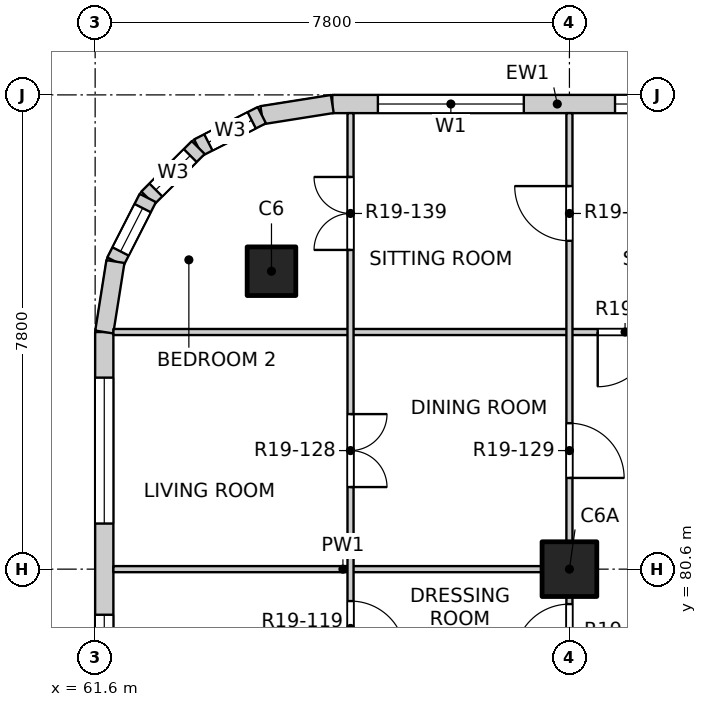
"""IFC4 building model, lengths in metres.
Left out: names, types, materials, properties, quantities, classifications, styles, units other than length and angle.
Written with IfcOpenShell. Run it as: python <this file> out.ifc"""

import sys

from ifc_helpers import new_model, si_unit, direction, frame, frame_2d, origin, origin_2d, place, context, subcontext, project, spatial, rectangle, extrude, element, fill, save


model = new_model("IFC4")
c1 = context("Model", 3, precision=1e-05, world=origin(), true_north=direction((0.0, 1.0)))
c2 = subcontext(c1, "Body", "Model", "MODEL_VIEW")
j1 = project(units=[si_unit("LENGTHUNIT", "METRE"), si_unit("PLANEANGLEUNIT", "RADIAN")], contexts=[c1])
p1 = place(None, origin())
s1 = spatial("IfcSite", under=j1, at=p1, CompositionType="ELEMENT")
p2 = place(p1, origin())
s2 = spatial("IfcBuilding", under=s1, at=p2, CompositionType="ELEMENT")
p3 = place(p2, frame((0.0, 0.0, 197.3)))
s3 = spatial("IfcBuildingStorey", under=s2, at=p3, CompositionType="ELEMENT", Elevation=197.3)
p4 = place(p3, frame((64.5, 85.5, -0.3), z_axis=(0.0, 0.0, 1.0), x_axis=(1.0, 0.0, 0.0)))
e1 = element("IfcColumn", 1, at=p4, inside=s3, PredefinedType="COLUMN", context=c2, shape_type="SweptSolid", body=[
    extrude(rectangle(XDim=0.8, YDim=0.8, at=origin_2d()), origin(), (0.0, 0.0, 1.0), 3.45),
])
p5 = place(p3, frame((69.4, 80.6, -0.3), z_axis=(0.0, 0.0, 1.0), x_axis=(1.0, 0.0, 0.0)))
e2 = element("IfcColumn", 2, at=p5, inside=s3, PredefinedType="COLUMN", context=c2, shape_type="SweptSolid", body=[
    extrude(rectangle(XDim=0.9, YDim=0.9, at=origin_2d()), origin(), (0.0, 0.0, 1.0), 3.45),
])
p6 = place(p3, frame((65.5, 88.25, 0.0), z_axis=(0.0, 0.0, 1.0), x_axis=(1.0, 0.0, 0.0)))
e3 = element("IfcWall", 3, at=p6, inside=s3, PredefinedType="SOLIDWALL", context=c2, shape_type="SweptSolid", body=[
    extrude(rectangle(XDim=7.4, YDim=0.3, at=frame_2d((3.7, 0.0))), origin(), (0.0, 0.0, 1.0), 2.7),
])
p7 = place(p6, frame((0.75, 0.0, 0.9)))
e4 = element("IfcOpeningElement", 4, at=p7, cuts=e3, PredefinedType="OPENING", context=c2, shape_type="SweptSolid", body=[
    extrude(rectangle(XDim=2.4, YDim=1.8, at=frame_2d((1.2, 0.9))), frame((0.0, 0.16, 0.0), z_axis=(0.0, -1.0, 0.0), x_axis=(1.0, 0.0, 0.0)), (0.0, 0.0, 1.0), 0.32),
])
p8 = place(p6, frame((4.65, 0.0, 0.9)))
e5 = element("IfcOpeningElement", 5, at=p8, cuts=e3, PredefinedType="OPENING", context=c2, shape_type="SweptSolid", body=[
    extrude(rectangle(XDim=2.4, YDim=1.8, at=frame_2d((1.2, 0.9))), frame((0.0, 0.16, 0.0), z_axis=(0.0, -1.0, 0.0), x_axis=(1.0, 0.0, 0.0)), (0.0, 0.0, 1.0), 0.32),
])
p9 = place(p3, frame((61.75, 77.1, 0.0), z_axis=(0.0, 0.0, 1.0), x_axis=(0.0, 1.0, 0.0)))
e6 = element("IfcWall", 6, at=p9, inside=s3, PredefinedType="SOLIDWALL", context=c2, shape_type="SweptSolid", body=[
    extrude(rectangle(XDim=7.4, YDim=0.3, at=frame_2d((3.7, 0.0))), origin(), (0.0, 0.0, 1.0), 2.7),
])
p10 = place(p9, frame((0.35, 0.0, 0.9)))
e7 = element("IfcOpeningElement", 7, at=p10, cuts=e6, PredefinedType="OPENING", context=c2, shape_type="SweptSolid", body=[
    extrude(rectangle(XDim=2.4, YDim=1.8, at=frame_2d((1.2, 0.9))), frame((0.0, 0.16, 0.0), z_axis=(0.0, -1.0, 0.0), x_axis=(1.0, 0.0, 0.0)), (0.0, 0.0, 1.0), 0.32),
])
p11 = place(p9, frame((4.25, 0.0, 0.9)))
e8 = element("IfcOpeningElement", 8, at=p11, cuts=e6, PredefinedType="OPENING", context=c2, shape_type="SweptSolid", body=[
    extrude(rectangle(XDim=2.4, YDim=1.8, at=frame_2d((1.2, 0.9))), frame((0.0, 0.16, 0.0), z_axis=(0.0, -1.0, 0.0), x_axis=(1.0, 0.0, 0.0)), (0.0, 0.0, 1.0), 0.32),
])
p12 = place(p3, frame((65.5, 88.25, 0.0), z_axis=(0.0, 0.0, 1.0), x_axis=(-0.987678452879, -0.156496880861, 0.0)))
e9 = element("IfcWall", 9, at=p12, inside=s3, PredefinedType="SOLIDWALL", context=c2, shape_type="SweptSolid", body=[
    extrude(rectangle(XDim=1.173, YDim=0.3, at=frame_2d((0.586, 0.0))), origin(), (0.0, 0.0, 1.0), 2.7),
])
p13 = place(p3, frame((64.341, 88.066, 0.0), z_axis=(0.0, 0.0, 1.0), x_axis=(-0.890988677504, -0.454025524128, 0.0)))
e10 = element("IfcWall", 10, at=p13, inside=s3, PredefinedType="SOLIDWALL", context=c2, shape_type="SweptSolid", body=[
    extrude(rectangle(XDim=1.173, YDim=0.3, at=frame_2d((0.587, 0.0))), origin(), (0.0, 0.0, 1.0), 2.7),
])
p14 = place(p13, frame((0.187, 0.0, 0.9)))
e11 = element("IfcOpeningElement", 11, at=p14, cuts=e10, PredefinedType="OPENING", context=c2, shape_type="SweptSolid", body=[
    extrude(rectangle(XDim=0.8, YDim=1.2, at=frame_2d((0.4, 0.6))), frame((0.0, 0.16, 0.0), z_axis=(0.0, -1.0, 0.0), x_axis=(1.0, 0.0, 0.0)), (0.0, 0.0, 1.0), 0.32),
])
p15 = place(p3, frame((63.296, 87.534, 0.0), z_axis=(0.0, 0.0, 1.0), x_axis=(-0.707106781187, -0.707106781187, 0.0)))
e12 = element("IfcWall", 12, at=p15, inside=s3, PredefinedType="SOLIDWALL", context=c2, shape_type="SweptSolid", body=[
    extrude(rectangle(XDim=1.173, YDim=0.3, at=frame_2d((0.586, 0.0))), origin(), (0.0, 0.0, 1.0), 2.7),
])
p16 = place(p15, frame((0.187, 0.0, 0.9)))
e13 = element("IfcOpeningElement", 13, at=p16, cuts=e12, PredefinedType="OPENING", context=c2, shape_type="SweptSolid", body=[
    extrude(rectangle(XDim=0.8, YDim=1.2, at=frame_2d((0.4, 0.6))), frame((0.0, 0.16, 0.0), z_axis=(0.0, -1.0, 0.0), x_axis=(1.0, 0.0, 0.0)), (0.0, 0.0, 1.0), 0.32),
])
p17 = place(p3, frame((62.466, 86.704, 0.0), z_axis=(0.0, 0.0, 1.0), x_axis=(-0.454025524128, -0.890988677504, 0.0)))
e14 = element("IfcWall", 14, at=p17, inside=s3, PredefinedType="SOLIDWALL", context=c2, shape_type="SweptSolid", body=[
    extrude(rectangle(XDim=1.173, YDim=0.3, at=frame_2d((0.587, 0.0))), origin(), (0.0, 0.0, 1.0), 2.7),
])
p18 = place(p17, frame((0.187, 0.0, 0.9)))
e15 = element("IfcOpeningElement", 15, at=p18, cuts=e14, PredefinedType="OPENING", context=c2, shape_type="SweptSolid", body=[
    extrude(rectangle(XDim=0.8, YDim=1.2, at=frame_2d((0.4, 0.6))), frame((0.0, 0.16, 0.0), z_axis=(0.0, -1.0, 0.0), x_axis=(1.0, 0.0, 0.0)), (0.0, 0.0, 1.0), 0.32),
])
p19 = place(p3, frame((61.934, 85.659, 0.0), z_axis=(0.0, 0.0, 1.0), x_axis=(-0.156496880861, -0.987678452879, 0.0)))
e16 = element("IfcWall", 16, at=p19, inside=s3, PredefinedType="SOLIDWALL", context=c2, shape_type="SweptSolid", body=[
    extrude(rectangle(XDim=1.173, YDim=0.3, at=frame_2d((0.586, 0.0))), origin(), (0.0, 0.0, 1.0), 2.7),
])
p20 = place(p3, frame((61.9, 80.6, 0.0), z_axis=(0.0, 0.0, 1.0), x_axis=(1.0, 0.0, 0.0)))
e17 = element("IfcWall", 17, at=p20, inside=s3, PredefinedType="PARTITIONING", context=c2, shape_type="SweptSolid", body=[
    extrude(rectangle(XDim=7.55, YDim=0.1, at=frame_2d((3.775, 0.0))), origin(), (0.0, 0.0, 1.0), 3.15),
])
p21 = place(p3, frame((61.9, 84.5, 0.0), z_axis=(0.0, 0.0, 1.0), x_axis=(1.0, 0.0, 0.0)))
e18 = element("IfcWall", 18, at=p21, inside=s3, PredefinedType="PARTITIONING", context=c2, shape_type="SweptSolid", body=[
    extrude(rectangle(XDim=11.5, YDim=0.1, at=frame_2d((5.75, 0.0))), origin(), (0.0, 0.0, 1.0), 3.15),
])
p22 = place(p21, frame((7.965, 0.0, 0.0)))
e19 = element("IfcOpeningElement", 19, at=p22, cuts=e18, PredefinedType="OPENING", context=c2, shape_type="SweptSolid", body=[
    extrude(rectangle(XDim=0.9, YDim=2.1, at=frame_2d((0.45, 1.05))), frame((0.0, 0.06, 0.0), z_axis=(0.0, -1.0, 0.0), x_axis=(1.0, 0.0, 0.0)), (0.0, 0.0, 1.0), 0.12),
])
p23 = place(p3, frame((65.8, 61.2, 0.0), z_axis=(0.0, 0.0, 1.0), x_axis=(0.0, 1.0, 0.0)))
e20 = element("IfcWall", 20, at=p23, inside=s3, PredefinedType="PARTITIONING", context=c2, shape_type="SweptSolid", body=[
    extrude(rectangle(XDim=26.9, YDim=0.1, at=frame_2d((13.45, 0.0))), origin(), (0.0, 0.0, 1.0), 3.15),
])
p24 = place(p23, frame((0.425, 0.0, 0.0)))
e21 = element("IfcOpeningElement", 21, at=p24, cuts=e20, PredefinedType="OPENING", context=c2, shape_type="SweptSolid", body=[
    extrude(rectangle(XDim=0.9, YDim=2.1, at=frame_2d((0.45, 1.05))), frame((0.0, 0.06, 0.0), z_axis=(0.0, -1.0, 0.0), x_axis=(1.0, 0.0, 0.0)), (0.0, 0.0, 1.0), 0.12),
])
p25 = place(p23, frame((2.375, 0.0, 0.0)))
e22 = element("IfcOpeningElement", 22, at=p25, cuts=e20, PredefinedType="OPENING", context=c2, shape_type="SweptSolid", body=[
    extrude(rectangle(XDim=0.9, YDim=2.1, at=frame_2d((0.45, 1.05))), frame((0.0, 0.06, 0.0), z_axis=(0.0, -1.0, 0.0), x_axis=(1.0, 0.0, 0.0)), (0.0, 0.0, 1.0), 0.12),
])
p26 = place(p23, frame((5.15, 0.0, 0.0)))
e23 = element("IfcOpeningElement", 23, at=p26, cuts=e20, PredefinedType="OPENING", context=c2, shape_type="SweptSolid", body=[
    extrude(rectangle(XDim=1.2, YDim=2.1, at=frame_2d((0.6, 1.05))), frame((0.0, 0.06, 0.0), z_axis=(0.0, -1.0, 0.0), x_axis=(1.0, 0.0, 0.0)), (0.0, 0.0, 1.0), 0.12),
])
p27 = place(p23, frame((8.225, 0.0, 0.0)))
e24 = element("IfcOpeningElement", 24, at=p27, cuts=e20, PredefinedType="OPENING", context=c2, shape_type="SweptSolid", body=[
    extrude(rectangle(XDim=0.9, YDim=2.1, at=frame_2d((0.45, 1.05))), frame((0.0, 0.06, 0.0), z_axis=(0.0, -1.0, 0.0), x_axis=(1.0, 0.0, 0.0)), (0.0, 0.0, 1.0), 0.12),
])
p28 = place(p23, frame((10.175, 0.0, 0.0)))
e25 = element("IfcOpeningElement", 25, at=p28, cuts=e20, PredefinedType="OPENING", context=c2, shape_type="SweptSolid", body=[
    extrude(rectangle(XDim=0.9, YDim=2.1, at=frame_2d((0.45, 1.05))), frame((0.0, 0.06, 0.0), z_axis=(0.0, -1.0, 0.0), x_axis=(1.0, 0.0, 0.0)), (0.0, 0.0, 1.0), 0.12),
])
p29 = place(p23, frame((12.125, 0.0, 0.0)))
e26 = element("IfcOpeningElement", 26, at=p29, cuts=e20, PredefinedType="OPENING", context=c2, shape_type="SweptSolid", body=[
    extrude(rectangle(XDim=0.9, YDim=2.1, at=frame_2d((0.45, 1.05))), frame((0.0, 0.06, 0.0), z_axis=(0.0, -1.0, 0.0), x_axis=(1.0, 0.0, 0.0)), (0.0, 0.0, 1.0), 0.12),
])
p30 = place(p23, frame((14.075, 0.0, 0.0)))
e27 = element("IfcOpeningElement", 27, at=p30, cuts=e20, PredefinedType="OPENING", context=c2, shape_type="SweptSolid", body=[
    extrude(rectangle(XDim=0.9, YDim=2.1, at=frame_2d((0.45, 1.05))), frame((0.0, 0.06, 0.0), z_axis=(0.0, -1.0, 0.0), x_axis=(1.0, 0.0, 0.0)), (0.0, 0.0, 1.0), 0.12),
])
p31 = place(p23, frame((16.025, 0.0, 0.0)))
e28 = element("IfcOpeningElement", 28, at=p31, cuts=e20, PredefinedType="OPENING", context=c2, shape_type="SweptSolid", body=[
    extrude(rectangle(XDim=0.9, YDim=2.1, at=frame_2d((0.45, 1.05))), frame((0.0, 0.06, 0.0), z_axis=(0.0, -1.0, 0.0), x_axis=(1.0, 0.0, 0.0)), (0.0, 0.0, 1.0), 0.12),
])
p32 = place(p23, frame((17.975, 0.0, 0.0)))
e29 = element("IfcOpeningElement", 29, at=p32, cuts=e20, PredefinedType="OPENING", context=c2, shape_type="SweptSolid", body=[
    extrude(rectangle(XDim=0.9, YDim=2.1, at=frame_2d((0.45, 1.05))), frame((0.0, 0.06, 0.0), z_axis=(0.0, -1.0, 0.0), x_axis=(1.0, 0.0, 0.0)), (0.0, 0.0, 1.0), 0.12),
])
p33 = place(p23, frame((20.75, 0.0, 0.0)))
e30 = element("IfcOpeningElement", 30, at=p33, cuts=e20, PredefinedType="OPENING", context=c2, shape_type="SweptSolid", body=[
    extrude(rectangle(XDim=1.2, YDim=2.1, at=frame_2d((0.6, 1.05))), frame((0.0, 0.06, 0.0), z_axis=(0.0, -1.0, 0.0), x_axis=(1.0, 0.0, 0.0)), (0.0, 0.0, 1.0), 0.12),
])
p34 = place(p23, frame((24.65, 0.0, 0.0)))
e31 = element("IfcOpeningElement", 31, at=p34, cuts=e20, PredefinedType="OPENING", context=c2, shape_type="SweptSolid", body=[
    extrude(rectangle(XDim=1.2, YDim=2.1, at=frame_2d((0.6, 1.05))), frame((0.0, 0.06, 0.0), z_axis=(0.0, -1.0, 0.0), x_axis=(1.0, 0.0, 0.0)), (0.0, 0.0, 1.0), 0.12),
])
p35 = place(p3, frame((69.4, 41.9, 0.0), z_axis=(0.0, 0.0, 1.0), x_axis=(0.0, 1.0, 0.0)))
e32 = element("IfcWall", 32, at=p35, inside=s3, PredefinedType="PARTITIONING", context=c2, shape_type="SweptSolid", body=[
    extrude(rectangle(XDim=46.2, YDim=0.1, at=frame_2d((23.1, 0.0))), origin(), (0.0, 0.0, 1.0), 3.15),
])
p36 = place(p35, frame((1.2, 0.0, 0.0)))
e33 = element("IfcOpeningElement", 33, at=p36, cuts=e32, PredefinedType="OPENING", context=c2, shape_type="SweptSolid", body=[
    extrude(rectangle(XDim=0.9, YDim=2.1, at=frame_2d((0.45, 1.05))), frame((0.0, 0.06, 0.0), z_axis=(0.0, -1.0, 0.0), x_axis=(1.0, 0.0, 0.0)), (0.0, 0.0, 1.0), 0.12),
])
p37 = place(p35, frame((5.1, 0.0, 0.0)))
e34 = element("IfcOpeningElement", 34, at=p37, cuts=e32, PredefinedType="OPENING", context=c2, shape_type="SweptSolid", body=[
    extrude(rectangle(XDim=0.9, YDim=2.1, at=frame_2d((0.45, 1.05))), frame((0.0, 0.06, 0.0), z_axis=(0.0, -1.0, 0.0), x_axis=(1.0, 0.0, 0.0)), (0.0, 0.0, 1.0), 0.12),
])
p38 = place(p35, frame((9.0, 0.0, 0.0)))
e35 = element("IfcOpeningElement", 35, at=p38, cuts=e32, PredefinedType="OPENING", context=c2, shape_type="SweptSolid", body=[
    extrude(rectangle(XDim=0.9, YDim=2.1, at=frame_2d((0.45, 1.05))), frame((0.0, 0.06, 0.0), z_axis=(0.0, -1.0, 0.0), x_axis=(1.0, 0.0, 0.0)), (0.0, 0.0, 1.0), 0.12),
])
p39 = place(p35, frame((13.85, 0.0, 0.0)))
e36 = element("IfcOpeningElement", 36, at=p39, cuts=e32, PredefinedType="OPENING", context=c2, shape_type="SweptSolid", body=[
    extrude(rectangle(XDim=0.9, YDim=2.1, at=frame_2d((0.45, 1.05))), frame((0.0, 0.06, 0.0), z_axis=(0.0, -1.0, 0.0), x_axis=(1.0, 0.0, 0.0)), (0.0, 0.0, 1.0), 0.12),
])
p40 = place(p35, frame((17.775, 0.0, 0.0)))
e37 = element("IfcOpeningElement", 37, at=p40, cuts=e32, PredefinedType="OPENING", context=c2, shape_type="SweptSolid", body=[
    extrude(rectangle(XDim=0.9, YDim=2.1, at=frame_2d((0.45, 1.05))), frame((0.0, 0.06, 0.0), z_axis=(0.0, -1.0, 0.0), x_axis=(1.0, 0.0, 0.0)), (0.0, 0.0, 1.0), 0.12),
])
p41 = place(p35, frame((21.625, 0.0, 0.0)))
e38 = element("IfcOpeningElement", 38, at=p41, cuts=e32, PredefinedType="OPENING", context=c2, shape_type="SweptSolid", body=[
    extrude(rectangle(XDim=0.9, YDim=2.1, at=frame_2d((0.45, 1.05))), frame((0.0, 0.06, 0.0), z_axis=(0.0, -1.0, 0.0), x_axis=(1.0, 0.0, 0.0)), (0.0, 0.0, 1.0), 0.12),
])
p42 = place(p35, frame((24.6, 0.0, 0.0)))
e39 = element("IfcOpeningElement", 39, at=p42, cuts=e32, PredefinedType="OPENING", context=c2, shape_type="SweptSolid", body=[
    extrude(rectangle(XDim=0.9, YDim=2.1, at=frame_2d((0.45, 1.05))), frame((0.0, 0.06, 0.0), z_axis=(0.0, -1.0, 0.0), x_axis=(1.0, 0.0, 0.0)), (0.0, 0.0, 1.0), 0.12),
])
p43 = place(p35, frame((29.425, 0.0, 0.0)))
e40 = element("IfcOpeningElement", 40, at=p43, cuts=e32, PredefinedType="OPENING", context=c2, shape_type="SweptSolid", body=[
    extrude(rectangle(XDim=0.9, YDim=2.1, at=frame_2d((0.45, 1.05))), frame((0.0, 0.06, 0.0), z_axis=(0.0, -1.0, 0.0), x_axis=(1.0, 0.0, 0.0)), (0.0, 0.0, 1.0), 0.12),
])
p44 = place(p35, frame((33.375, 0.0, 0.0)))
e41 = element("IfcOpeningElement", 41, at=p44, cuts=e32, PredefinedType="OPENING", context=c2, shape_type="SweptSolid", body=[
    extrude(rectangle(XDim=0.9, YDim=2.1, at=frame_2d((0.45, 1.05))), frame((0.0, 0.06, 0.0), z_axis=(0.0, -1.0, 0.0), x_axis=(1.0, 0.0, 0.0)), (0.0, 0.0, 1.0), 0.12),
])
p45 = place(p35, frame((37.225, 0.0, 0.0)))
e42 = element("IfcOpeningElement", 42, at=p45, cuts=e32, PredefinedType="OPENING", context=c2, shape_type="SweptSolid", body=[
    extrude(rectangle(XDim=0.9, YDim=2.1, at=frame_2d((0.45, 1.05))), frame((0.0, 0.06, 0.0), z_axis=(0.0, -1.0, 0.0), x_axis=(1.0, 0.0, 0.0)), (0.0, 0.0, 1.0), 0.12),
])
p46 = place(p35, frame((40.2, 0.0, 0.0)))
e43 = element("IfcOpeningElement", 43, at=p46, cuts=e32, PredefinedType="OPENING", context=c2, shape_type="SweptSolid", body=[
    extrude(rectangle(XDim=0.9, YDim=2.1, at=frame_2d((0.45, 1.05))), frame((0.0, 0.06, 0.0), z_axis=(0.0, -1.0, 0.0), x_axis=(1.0, 0.0, 0.0)), (0.0, 0.0, 1.0), 0.12),
])
p47 = place(p35, frame((44.1, 0.0, 0.0)))
e44 = element("IfcOpeningElement", 44, at=p47, cuts=e32, PredefinedType="OPENING", context=c2, shape_type="SweptSolid", body=[
    extrude(rectangle(XDim=0.9, YDim=2.1, at=frame_2d((0.45, 1.05))), frame((0.0, 0.06, 0.0), z_axis=(0.0, -1.0, 0.0), x_axis=(1.0, 0.0, 0.0)), (0.0, 0.0, 1.0), 0.12),
])
p48 = place(p7, origin())
e45 = element("IfcWindow", 45, at=p48, inside=s3, PartitioningType="DOUBLE_PANEL_VERTICAL", PredefinedType="WINDOW", context=c2, shape_type="SweptSolid", body=[
    extrude(rectangle(XDim=2.4, YDim=1.8, at=frame_2d((1.2, 0.9))), frame((0.0, 0.03, 0.0), z_axis=(0.0, -1.0, 0.0), x_axis=(1.0, 0.0, 0.0)), (0.0, 0.0, 1.0), 0.06),
])
fill(e4, e45)
p49 = place(p8, origin())
e46 = element("IfcWindow", 46, at=p49, inside=s3, PartitioningType="DOUBLE_PANEL_VERTICAL", PredefinedType="WINDOW", context=c2, shape_type="SweptSolid", body=[
    extrude(rectangle(XDim=2.4, YDim=1.8, at=frame_2d((1.2, 0.9))), frame((0.0, 0.03, 0.0), z_axis=(0.0, -1.0, 0.0), x_axis=(1.0, 0.0, 0.0)), (0.0, 0.0, 1.0), 0.06),
])
fill(e5, e46)
p50 = place(p10, origin())
e47 = element("IfcWindow", 47, at=p50, inside=s3, PartitioningType="DOUBLE_PANEL_VERTICAL", PredefinedType="WINDOW", context=c2, shape_type="SweptSolid", body=[
    extrude(rectangle(XDim=2.4, YDim=1.8, at=frame_2d((1.2, 0.9))), frame((0.0, 0.03, 0.0), z_axis=(0.0, -1.0, 0.0), x_axis=(1.0, 0.0, 0.0)), (0.0, 0.0, 1.0), 0.06),
])
fill(e7, e47)
p51 = place(p11, origin())
e48 = element("IfcWindow", 48, at=p51, inside=s3, PartitioningType="DOUBLE_PANEL_VERTICAL", PredefinedType="WINDOW", context=c2, shape_type="SweptSolid", body=[
    extrude(rectangle(XDim=2.4, YDim=1.8, at=frame_2d((1.2, 0.9))), frame((0.0, 0.03, 0.0), z_axis=(0.0, -1.0, 0.0), x_axis=(1.0, 0.0, 0.0)), (0.0, 0.0, 1.0), 0.06),
])
fill(e8, e48)
p52 = place(p14, origin())
e49 = element("IfcWindow", 49, at=p52, inside=s3, PartitioningType="SINGLE_PANEL", PredefinedType="WINDOW", context=c2, shape_type="SweptSolid", body=[
    extrude(rectangle(XDim=0.8, YDim=1.2, at=frame_2d((0.4, 0.6))), frame((0.0, 0.03, 0.0), z_axis=(0.0, -1.0, 0.0), x_axis=(1.0, 0.0, 0.0)), (0.0, 0.0, 1.0), 0.06),
])
fill(e11, e49)
p53 = place(p16, origin())
e50 = element("IfcWindow", 50, at=p53, inside=s3, PartitioningType="SINGLE_PANEL", PredefinedType="WINDOW", context=c2, shape_type="SweptSolid", body=[
    extrude(rectangle(XDim=0.8, YDim=1.2, at=frame_2d((0.4, 0.6))), frame((0.0, 0.03, 0.0), z_axis=(0.0, -1.0, 0.0), x_axis=(1.0, 0.0, 0.0)), (0.0, 0.0, 1.0), 0.06),
])
fill(e13, e50)
p54 = place(p18, origin())
e51 = element("IfcWindow", 51, at=p54, inside=s3, PartitioningType="SINGLE_PANEL", PredefinedType="WINDOW", context=c2, shape_type="SweptSolid", body=[
    extrude(rectangle(XDim=0.8, YDim=1.2, at=frame_2d((0.4, 0.6))), frame((0.0, 0.03, 0.0), z_axis=(0.0, -1.0, 0.0), x_axis=(1.0, 0.0, 0.0)), (0.0, 0.0, 1.0), 0.06),
])
fill(e15, e51)
p55 = place(p45, origin())
e52 = element("IfcDoor", 52, at=p55, inside=s3, OperationType="SINGLE_SWING_LEFT", PredefinedType="DOOR", context=c2, shape_type="SweptSolid", body=[
    extrude(rectangle(XDim=0.9, YDim=2.1, at=frame_2d((0.45, 1.05))), frame((0.0, 0.025, 0.0), z_axis=(0.0, -1.0, 0.0), x_axis=(1.0, 0.0, 0.0)), (0.0, 0.0, 1.0), 0.05),
])
fill(e42, e52)
p56 = place(p32, origin())
e53 = element("IfcDoor", 53, at=p56, inside=s3, OperationType="SINGLE_SWING_RIGHT", PredefinedType="DOOR", context=c2, shape_type="SweptSolid", body=[
    extrude(rectangle(XDim=0.9, YDim=2.1, at=frame_2d((0.45, 1.05))), frame((0.0, 0.025, 0.0), z_axis=(0.0, -1.0, 0.0), x_axis=(1.0, 0.0, 0.0)), (0.0, 0.0, 1.0), 0.05),
])
fill(e29, e53)
p57 = place(p33, origin())
e54 = element("IfcDoor", 54, at=p57, inside=s3, OperationType="DOUBLE_DOOR_SINGLE_SWING", PredefinedType="DOOR", context=c2, shape_type="SweptSolid", body=[
    extrude(rectangle(XDim=1.2, YDim=2.1, at=frame_2d((0.6, 1.05))), frame((0.0, 0.025, 0.0), z_axis=(0.0, -1.0, 0.0), x_axis=(1.0, 0.0, 0.0)), (0.0, 0.0, 1.0), 0.05),
])
fill(e30, e54)
p58 = place(p46, origin())
e55 = element("IfcDoor", 55, at=p58, inside=s3, OperationType="SINGLE_SWING_RIGHT", PredefinedType="DOOR", context=c2, shape_type="SweptSolid", body=[
    extrude(rectangle(XDim=0.9, YDim=2.1, at=frame_2d((0.45, 1.05))), frame((0.0, 0.025, 0.0), z_axis=(0.0, -1.0, 0.0), x_axis=(1.0, 0.0, 0.0)), (0.0, 0.0, 1.0), 0.05),
])
fill(e43, e55)
p59 = place(p22, origin())
e56 = element("IfcDoor", 56, at=p59, inside=s3, OperationType="SINGLE_SWING_RIGHT", PredefinedType="DOOR", context=c2, shape_type="SweptSolid", body=[
    extrude(rectangle(XDim=0.9, YDim=2.1, at=frame_2d((0.45, 1.05))), frame((0.0, 0.025, 0.0), z_axis=(0.0, -1.0, 0.0), x_axis=(1.0, 0.0, 0.0)), (0.0, 0.0, 1.0), 0.05),
])
fill(e19, e56)
p60 = place(p34, origin())
e57 = element("IfcDoor", 57, at=p60, inside=s3, OperationType="DOUBLE_DOOR_SINGLE_SWING", PredefinedType="DOOR", context=c2, shape_type="SweptSolid", body=[
    extrude(rectangle(XDim=1.2, YDim=2.1, at=frame_2d((0.6, 1.05))), frame((0.0, 0.025, 0.0), z_axis=(0.0, -1.0, 0.0), x_axis=(1.0, 0.0, 0.0)), (0.0, 0.0, 1.0), 0.05),
])
fill(e31, e57)
p61 = place(p47, origin())
e58 = element("IfcDoor", 58, at=p61, inside=s3, OperationType="SINGLE_SWING_RIGHT", PredefinedType="DOOR", context=c2, shape_type="SweptSolid", body=[
    extrude(rectangle(XDim=0.9, YDim=2.1, at=frame_2d((0.45, 1.05))), frame((0.0, 0.025, 0.0), z_axis=(0.0, -1.0, 0.0), x_axis=(1.0, 0.0, 0.0)), (0.0, 0.0, 1.0), 0.05),
])
fill(e44, e58)
save(model, sys.argv[1])
